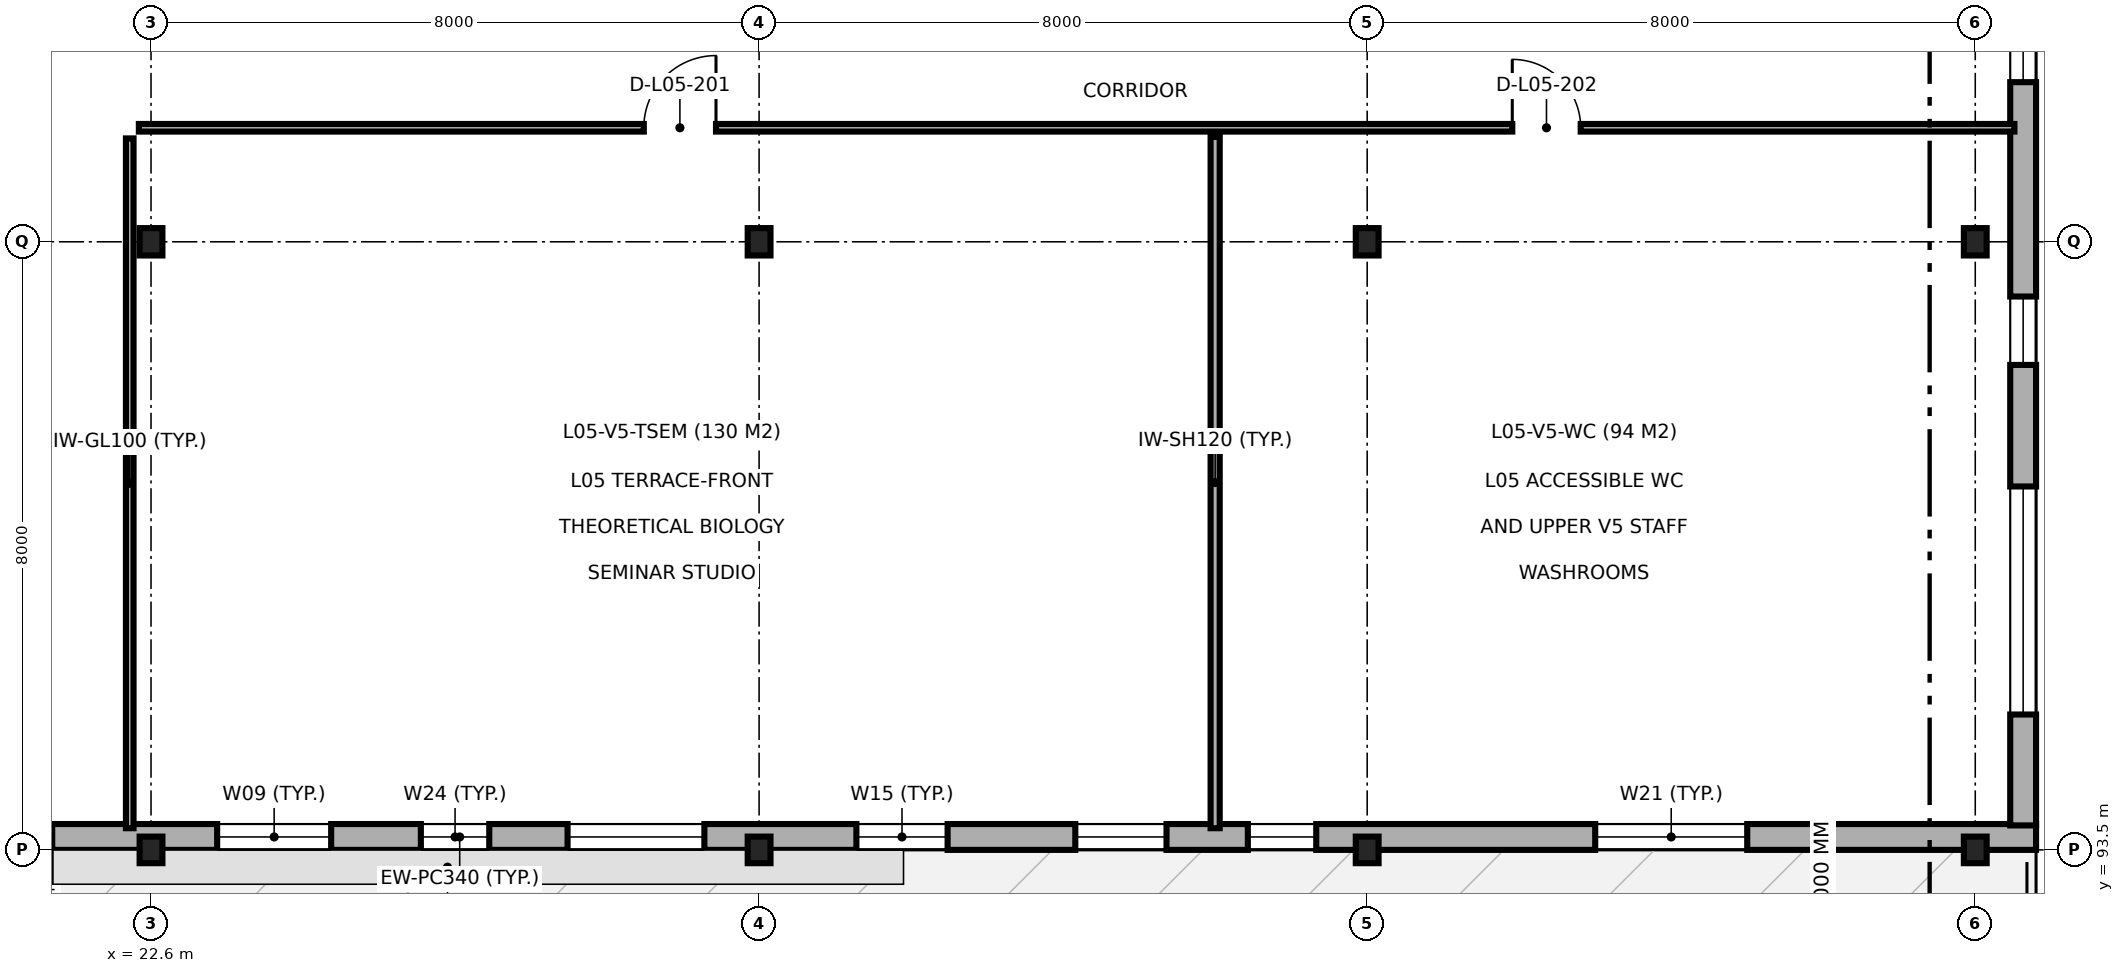
"""IFC4 building model, lengths in metres.
Left out: names, types, materials, properties, quantities, classifications, styles, units other than length and angle.
Written with IfcOpenShell. Run it as: python <this file> out.ifc"""

import sys

from ifc_helpers import new_model, si_unit, direction, frame, frame_2d, origin, origin_2d, place, context, subcontext, project, spatial, rectangle, i_section, extrude, element, fill, save


model = new_model("IFC4")
c1 = context("Model", 3, precision=1e-05, world=origin(), true_north=direction((0.0, 1.0)))
c2 = subcontext(c1, "Body", "Model", "MODEL_VIEW")
j1 = project(units=[si_unit("LENGTHUNIT", "METRE"), si_unit("PLANEANGLEUNIT", "RADIAN")], contexts=[c1])
p1 = place(None, origin())
s1 = spatial("IfcSite", under=j1, at=p1, CompositionType="ELEMENT")
p2 = place(p1, origin())
s2 = spatial("IfcBuilding", under=s1, at=p2, CompositionType="ELEMENT")
p3 = place(p2, frame((0.0, 0.0, 22.8)))
s3 = spatial("IfcBuildingStorey", under=s2, at=p3, CompositionType="ELEMENT", Elevation=22.8)
p4 = place(p3, frame((22.6, 93.5, 0.0), z_axis=(0.0, 0.0, 1.0), x_axis=(1.0, 0.0, 0.0)))
e1 = element("IfcColumn", 1, at=p4, inside=s3, PredefinedType="COLUMN", context=c2, shape_type="SweptSolid", body=[
    extrude(i_section(OverallWidth=0.3, OverallDepth=0.35, WebThickness=0.01, FlangeThickness=0.018, FilletRadius=0.027, at=origin_2d()), origin(), (0.0, 0.0, 1.0), 3.9),
])
p5 = place(p3, frame((22.6, 101.5, 0.0), z_axis=(0.0, 0.0, 1.0), x_axis=(1.0, 0.0, 0.0)))
e2 = element("IfcColumn", 2, at=p5, inside=s3, PredefinedType="COLUMN", context=c2, shape_type="SweptSolid", body=[
    extrude(i_section(OverallWidth=0.3, OverallDepth=0.36, WebThickness=0.012, FlangeThickness=0.022, FilletRadius=0.027, at=origin_2d()), origin(), (0.0, 0.0, 1.0), 3.9),
])
p6 = place(p3, frame((30.6, 93.5, 0.0), z_axis=(0.0, 0.0, 1.0), x_axis=(1.0, 0.0, 0.0)))
e3 = element("IfcColumn", 3, at=p6, inside=s3, PredefinedType="COLUMN", context=c2, shape_type="SweptSolid", body=[
    extrude(i_section(OverallWidth=0.3, OverallDepth=0.35, WebThickness=0.01, FlangeThickness=0.018, FilletRadius=0.027, at=origin_2d()), origin(), (0.0, 0.0, 1.0), 3.9),
])
p7 = place(p3, frame((30.6, 101.5, 0.0), z_axis=(0.0, 0.0, 1.0), x_axis=(1.0, 0.0, 0.0)))
e4 = element("IfcColumn", 4, at=p7, inside=s3, PredefinedType="COLUMN", context=c2, shape_type="SweptSolid", body=[
    extrude(i_section(OverallWidth=0.3, OverallDepth=0.36, WebThickness=0.012, FlangeThickness=0.022, FilletRadius=0.027, at=origin_2d()), origin(), (0.0, 0.0, 1.0), 3.9),
])
p8 = place(p3, frame((38.6, 93.5, 0.0), z_axis=(0.0, 0.0, 1.0), x_axis=(1.0, 0.0, 0.0)))
e5 = element("IfcColumn", 5, at=p8, inside=s3, PredefinedType="COLUMN", context=c2, shape_type="SweptSolid", body=[
    extrude(i_section(OverallWidth=0.3, OverallDepth=0.35, WebThickness=0.01, FlangeThickness=0.018, FilletRadius=0.027, at=origin_2d()), origin(), (0.0, 0.0, 1.0), 3.9),
])
p9 = place(p3, frame((38.6, 101.5, 0.0), z_axis=(0.0, 0.0, 1.0), x_axis=(1.0, 0.0, 0.0)))
e6 = element("IfcColumn", 6, at=p9, inside=s3, PredefinedType="COLUMN", context=c2, shape_type="SweptSolid", body=[
    extrude(i_section(OverallWidth=0.3, OverallDepth=0.36, WebThickness=0.012, FlangeThickness=0.022, FilletRadius=0.027, at=origin_2d()), origin(), (0.0, 0.0, 1.0), 3.9),
])
p10 = place(p3, frame((46.6, 93.5, 0.0), z_axis=(0.0, 0.0, 1.0), x_axis=(1.0, 0.0, 0.0)))
e7 = element("IfcColumn", 7, at=p10, inside=s3, PredefinedType="COLUMN", context=c2, shape_type="SweptSolid", body=[
    extrude(i_section(OverallWidth=0.3, OverallDepth=0.35, WebThickness=0.01, FlangeThickness=0.018, FilletRadius=0.027, at=origin_2d()), origin(), (0.0, 0.0, 1.0), 3.9),
])
p11 = place(p3, frame((46.6, 101.5, 0.0), z_axis=(0.0, 0.0, 1.0), x_axis=(1.0, 0.0, 0.0)))
e8 = element("IfcColumn", 8, at=p11, inside=s3, PredefinedType="COLUMN", context=c2, shape_type="SweptSolid", body=[
    extrude(i_section(OverallWidth=0.3, OverallDepth=0.36, WebThickness=0.012, FlangeThickness=0.022, FilletRadius=0.027, at=origin_2d()), origin(), (0.0, 0.0, 1.0), 3.9),
])
p12 = place(p3, frame((5.922, 93.67, 0.0), z_axis=(0.0, 0.0, 1.0), x_axis=(1.0, 0.0, 0.0)))
e9 = element("IfcWall", 9, at=p12, inside=s3, PredefinedType="SOLIDWALL", context=c2, shape_type="SweptSolid", body=[
    extrude(rectangle(XDim=41.478, YDim=0.34, at=frame_2d((20.739, 0.0))), origin(), (0.0, 0.0, 1.0), 3.68),
])
p13 = place(p12, frame((13.978, 0.0, 0.0)))
e10 = element("IfcOpeningElement", 10, at=p13, cuts=e9, PredefinedType="OPENING", context=c2, shape_type="SweptSolid", body=[
    extrude(rectangle(XDim=1.4, YDim=2.2, at=frame_2d((0.7, 1.1))), frame((0.0, 0.18, 0.0), z_axis=(0.0, -1.0, 0.0), x_axis=(1.0, 0.0, 0.0)), (0.0, 0.0, 1.0), 0.36),
])
p14 = place(p12, frame((3.778, 0.0, 0.9)))
e11 = element("IfcOpeningElement", 11, at=p14, cuts=e9, PredefinedType="OPENING", context=c2, shape_type="SweptSolid", body=[
    extrude(rectangle(XDim=1.8, YDim=1.8, at=frame_2d((0.9, 0.9))), frame((0.0, 0.18, 0.0), z_axis=(0.0, -1.0, 0.0), x_axis=(1.0, 0.0, 0.0)), (0.0, 0.0, 1.0), 0.36),
])
p15 = place(p12, frame((9.398, 0.0, 0.9)))
e12 = element("IfcOpeningElement", 12, at=p15, cuts=e9, PredefinedType="OPENING", context=c2, shape_type="SweptSolid", body=[
    extrude(rectangle(XDim=1.2, YDim=1.8, at=frame_2d((0.6, 0.9))), frame((0.0, 0.18, 0.0), z_axis=(0.0, -1.0, 0.0), x_axis=(1.0, 0.0, 0.0)), (0.0, 0.0, 1.0), 0.36),
])
p16 = place(p12, frame((11.523, 0.0, 0.9)))
e13 = element("IfcOpeningElement", 13, at=p16, cuts=e9, PredefinedType="OPENING", context=c2, shape_type="SweptSolid", body=[
    extrude(rectangle(XDim=1.8, YDim=2.1, at=frame_2d((0.9, 1.05))), frame((0.0, 0.18, 0.0), z_axis=(0.0, -1.0, 0.0), x_axis=(1.0, 0.0, 0.0)), (0.0, 0.0, 1.0), 0.36),
])
p17 = place(p12, frame((17.548, 0.0, 0.9)))
e14 = element("IfcOpeningElement", 14, at=p17, cuts=e9, PredefinedType="OPENING", context=c2, shape_type="SweptSolid", body=[
    extrude(rectangle(XDim=1.5, YDim=2.1, at=frame_2d((0.75, 1.05))), frame((0.0, 0.18, 0.0), z_axis=(0.0, -1.0, 0.0), x_axis=(1.0, 0.0, 0.0)), (0.0, 0.0, 1.0), 0.36),
])
p18 = place(p12, frame((20.228, 0.0, 0.9)))
e15 = element("IfcOpeningElement", 15, at=p18, cuts=e9, PredefinedType="OPENING", context=c2, shape_type="SweptSolid", body=[
    extrude(rectangle(XDim=0.9, YDim=1.8, at=frame_2d((0.45, 0.9))), frame((0.0, 0.18, 0.0), z_axis=(0.0, -1.0, 0.0), x_axis=(1.0, 0.0, 0.0)), (0.0, 0.0, 1.0), 0.36),
])
p19 = place(p12, frame((22.158, 0.0, 0.9)))
e16 = element("IfcOpeningElement", 16, at=p19, cuts=e9, PredefinedType="OPENING", context=c2, shape_type="SweptSolid", body=[
    extrude(rectangle(XDim=1.8, YDim=2.1, at=frame_2d((0.9, 1.05))), frame((0.0, 0.18, 0.0), z_axis=(0.0, -1.0, 0.0), x_axis=(1.0, 0.0, 0.0)), (0.0, 0.0, 1.0), 0.36),
])
p20 = place(p12, frame((25.958, 0.0, 0.9)))
e17 = element("IfcOpeningElement", 17, at=p20, cuts=e9, PredefinedType="OPENING", context=c2, shape_type="SweptSolid", body=[
    extrude(rectangle(XDim=1.2, YDim=1.5, at=frame_2d((0.6, 0.75))), frame((0.0, 0.18, 0.0), z_axis=(0.0, -1.0, 0.0), x_axis=(1.0, 0.0, 0.0)), (0.0, 0.0, 1.0), 0.36),
])
p21 = place(p12, frame((28.838, 0.0, 0.9)))
e18 = element("IfcOpeningElement", 18, at=p21, cuts=e9, PredefinedType="OPENING", context=c2, shape_type="SweptSolid", body=[
    extrude(rectangle(XDim=1.2, YDim=1.8, at=frame_2d((0.6, 0.9))), frame((0.0, 0.18, 0.0), z_axis=(0.0, -1.0, 0.0), x_axis=(1.0, 0.0, 0.0)), (0.0, 0.0, 1.0), 0.36),
])
p22 = place(p12, frame((31.108, 0.0, 0.9)))
e19 = element("IfcOpeningElement", 19, at=p22, cuts=e9, PredefinedType="OPENING", context=c2, shape_type="SweptSolid", body=[
    extrude(rectangle(XDim=0.9, YDim=1.8, at=frame_2d((0.45, 0.9))), frame((0.0, 0.18, 0.0), z_axis=(0.0, -1.0, 0.0), x_axis=(1.0, 0.0, 0.0)), (0.0, 0.0, 1.0), 0.36),
])
p23 = place(p12, frame((35.678, 0.0, 0.9)))
e20 = element("IfcOpeningElement", 20, at=p23, cuts=e9, PredefinedType="OPENING", context=c2, shape_type="SweptSolid", body=[
    extrude(rectangle(XDim=2.0, YDim=2.4, at=frame_2d((1.0, 1.2))), frame((0.0, 0.18, 0.0), z_axis=(0.0, -1.0, 0.0), x_axis=(1.0, 0.0, 0.0)), (0.0, 0.0, 1.0), 0.36),
])
p24 = place(p3, frame((47.23, 93.822, 0.0), z_axis=(0.0, 0.0, 1.0), x_axis=(0.0, 1.0, 0.0)))
e21 = element("IfcWall", 21, at=p24, inside=s3, PredefinedType="SOLIDWALL", context=c2, shape_type="SweptSolid", body=[
    extrude(rectangle(XDim=22.278, YDim=0.34, at=frame_2d((11.139, 0.0))), origin(), (0.0, 0.0, 1.0), 3.68),
])
p25 = place(p24, frame((1.459, 0.0, 0.9)))
e22 = element("IfcOpeningElement", 22, at=p25, cuts=e21, PredefinedType="OPENING", context=c2, shape_type="SweptSolid", body=[
    extrude(rectangle(XDim=3.0, YDim=2.1, at=frame_2d((1.5, 1.05))), frame((0.0, 0.18, 0.0), z_axis=(0.0, -1.0, 0.0), x_axis=(1.0, 0.0, 0.0)), (0.0, 0.0, 1.0), 0.36),
])
p26 = place(p24, frame((6.058, 0.0, 0.9)))
e23 = element("IfcOpeningElement", 23, at=p26, cuts=e21, PredefinedType="OPENING", context=c2, shape_type="SweptSolid", body=[
    extrude(rectangle(XDim=0.9, YDim=1.8, at=frame_2d((0.45, 0.9))), frame((0.0, 0.18, 0.0), z_axis=(0.0, -1.0, 0.0), x_axis=(1.0, 0.0, 0.0)), (0.0, 0.0, 1.0), 0.36),
])
p27 = place(p24, frame((9.778, 0.0, 0.9)))
e24 = element("IfcOpeningElement", 24, at=p27, cuts=e21, PredefinedType="OPENING", context=c2, shape_type="SweptSolid", body=[
    extrude(rectangle(XDim=1.2, YDim=1.8, at=frame_2d((0.6, 0.9))), frame((0.0, 0.18, 0.0), z_axis=(0.0, -1.0, 0.0), x_axis=(1.0, 0.0, 0.0)), (0.0, 0.0, 1.0), 0.36),
])
p28 = place(p24, frame((12.708, 0.0, 0.9)))
e25 = element("IfcOpeningElement", 25, at=p28, cuts=e21, PredefinedType="OPENING", context=c2, shape_type="SweptSolid", body=[
    extrude(rectangle(XDim=1.6, YDim=2.4, at=frame_2d((0.8, 1.2))), frame((0.0, 0.18, 0.0), z_axis=(0.0, -1.0, 0.0), x_axis=(1.0, 0.0, 0.0)), (0.0, 0.0, 1.0), 0.36),
])
p29 = place(p24, frame((17.368, 0.0, 0.9)))
e26 = element("IfcOpeningElement", 26, at=p29, cuts=e21, PredefinedType="OPENING", context=c2, shape_type="SweptSolid", body=[
    extrude(rectangle(XDim=2.6, YDim=2.4, at=frame_2d((1.3, 1.2))), frame((0.0, 0.18, 0.0), z_axis=(0.0, -1.0, 0.0), x_axis=(1.0, 0.0, 0.0)), (0.0, 0.0, 1.0), 0.36),
])
p30 = place(p3, frame((22.32, 93.785, 0.0), z_axis=(0.0, 0.0, 1.0), x_axis=(0.0, 1.0, 0.0)))
e27 = element("IfcWall", 27, at=p30, inside=s3, PredefinedType="PARTITIONING", context=c2, shape_type="SweptSolid", body=[
    extrude(rectangle(XDim=9.075, YDim=0.1, at=frame_2d((4.538, 0.0))), origin(), (0.0, 0.0, 1.0), 3.28),
])
p31 = place(p3, frame((36.6, 93.785, 0.0), z_axis=(0.0, 0.0, 1.0), x_axis=(0.0, 1.0, 0.0)))
e28 = element("IfcWall", 28, at=p31, inside=s3, PredefinedType="PARTITIONING", context=c2, shape_type="SweptSolid", body=[
    extrude(rectangle(XDim=9.095, YDim=0.12, at=frame_2d((4.547, 0.0))), origin(), (0.0, 0.0, 1.0), 3.68),
])
p32 = place(p3, frame((22.44, 103.0, 0.0), z_axis=(0.0, 0.0, 1.0), x_axis=(1.0, 0.0, 0.0)))
e29 = element("IfcWall", 29, at=p32, inside=s3, PredefinedType="PARTITIONING", context=c2, shape_type="SweptSolid", body=[
    extrude(rectangle(XDim=24.675, YDim=0.1, at=frame_2d((12.337, 0.0))), origin(), (0.0, 0.0, 1.0), 3.68),
])
p33 = place(p32, frame((6.643, 0.0, 0.0)))
e30 = element("IfcOpeningElement", 30, at=p33, cuts=e29, PredefinedType="OPENING", context=c2, shape_type="SweptSolid", body=[
    extrude(rectangle(XDim=0.95, YDim=2.1, at=frame_2d((0.475, 1.05))), frame((0.0, 0.06, 0.0), z_axis=(0.0, -1.0, 0.0), x_axis=(1.0, 0.0, 0.0)), (0.0, 0.0, 1.0), 0.12),
])
p34 = place(p32, frame((18.069, 0.0, 0.0)))
e31 = element("IfcOpeningElement", 31, at=p34, cuts=e29, PredefinedType="OPENING", context=c2, shape_type="SweptSolid", body=[
    extrude(rectangle(XDim=0.9, YDim=2.1, at=frame_2d((0.45, 1.05))), frame((0.0, 0.06, 0.0), z_axis=(0.0, -1.0, 0.0), x_axis=(1.0, 0.0, 0.0)), (0.0, 0.0, 1.0), 0.12),
])
p35 = place(p17, origin())
e32 = element("IfcWindow", 32, at=p35, inside=s3, PartitioningType="SINGLE_PANEL", PredefinedType="WINDOW", context=c2, shape_type="SweptSolid", body=[
    extrude(rectangle(XDim=1.5, YDim=2.1, at=frame_2d((0.75, 1.05))), frame((0.0, 0.03, 0.0), z_axis=(0.0, -1.0, 0.0), x_axis=(1.0, 0.0, 0.0)), (0.0, 0.0, 1.0), 0.06),
])
fill(e14, e32)
p36 = place(p18, origin())
e33 = element("IfcWindow", 33, at=p36, inside=s3, PartitioningType="SINGLE_PANEL", PredefinedType="WINDOW", context=c2, shape_type="SweptSolid", body=[
    extrude(rectangle(XDim=0.9, YDim=1.8, at=frame_2d((0.45, 0.9))), frame((0.0, 0.03, 0.0), z_axis=(0.0, -1.0, 0.0), x_axis=(1.0, 0.0, 0.0)), (0.0, 0.0, 1.0), 0.06),
])
fill(e15, e33)
p37 = place(p19, origin())
e34 = element("IfcWindow", 34, at=p37, inside=s3, PartitioningType="SINGLE_PANEL", PredefinedType="WINDOW", context=c2, shape_type="SweptSolid", body=[
    extrude(rectangle(XDim=1.8, YDim=2.1, at=frame_2d((0.9, 1.05))), frame((0.0, 0.03, 0.0), z_axis=(0.0, -1.0, 0.0), x_axis=(1.0, 0.0, 0.0)), (0.0, 0.0, 1.0), 0.06),
])
fill(e16, e34)
p38 = place(p20, origin())
e35 = element("IfcWindow", 35, at=p38, inside=s3, PartitioningType="SINGLE_PANEL", PredefinedType="WINDOW", context=c2, shape_type="SweptSolid", body=[
    extrude(rectangle(XDim=1.2, YDim=1.5, at=frame_2d((0.6, 0.75))), frame((0.0, 0.03, 0.0), z_axis=(0.0, -1.0, 0.0), x_axis=(1.0, 0.0, 0.0)), (0.0, 0.0, 1.0), 0.06),
])
fill(e17, e35)
p39 = place(p21, origin())
e36 = element("IfcWindow", 36, at=p39, inside=s3, PartitioningType="SINGLE_PANEL", PredefinedType="WINDOW", context=c2, shape_type="SweptSolid", body=[
    extrude(rectangle(XDim=1.2, YDim=1.8, at=frame_2d((0.6, 0.9))), frame((0.0, 0.03, 0.0), z_axis=(0.0, -1.0, 0.0), x_axis=(1.0, 0.0, 0.0)), (0.0, 0.0, 1.0), 0.06),
])
fill(e18, e36)
p40 = place(p22, origin())
e37 = element("IfcWindow", 37, at=p40, inside=s3, PartitioningType="SINGLE_PANEL", PredefinedType="WINDOW", context=c2, shape_type="SweptSolid", body=[
    extrude(rectangle(XDim=0.9, YDim=1.8, at=frame_2d((0.45, 0.9))), frame((0.0, 0.03, 0.0), z_axis=(0.0, -1.0, 0.0), x_axis=(1.0, 0.0, 0.0)), (0.0, 0.0, 1.0), 0.06),
])
fill(e19, e37)
p41 = place(p23, origin())
e38 = element("IfcWindow", 38, at=p41, inside=s3, PartitioningType="SINGLE_PANEL", PredefinedType="WINDOW", context=c2, shape_type="SweptSolid", body=[
    extrude(rectangle(XDim=2.0, YDim=2.4, at=frame_2d((1.0, 1.2))), frame((0.0, 0.03, 0.0), z_axis=(0.0, -1.0, 0.0), x_axis=(1.0, 0.0, 0.0)), (0.0, 0.0, 1.0), 0.06),
])
fill(e20, e38)
p42 = place(p25, origin())
e39 = element("IfcWindow", 39, at=p42, inside=s3, PartitioningType="SINGLE_PANEL", PredefinedType="WINDOW", context=c2, shape_type="SweptSolid", body=[
    extrude(rectangle(XDim=3.0, YDim=2.1, at=frame_2d((1.5, 1.05))), frame((0.0, 0.03, 0.0), z_axis=(0.0, -1.0, 0.0), x_axis=(1.0, 0.0, 0.0)), (0.0, 0.0, 1.0), 0.06),
])
fill(e22, e39)
p43 = place(p26, origin())
e40 = element("IfcWindow", 40, at=p43, inside=s3, PartitioningType="SINGLE_PANEL", PredefinedType="WINDOW", context=c2, shape_type="SweptSolid", body=[
    extrude(rectangle(XDim=0.9, YDim=1.8, at=frame_2d((0.45, 0.9))), frame((0.0, 0.03, 0.0), z_axis=(0.0, -1.0, 0.0), x_axis=(1.0, 0.0, 0.0)), (0.0, 0.0, 1.0), 0.06),
])
fill(e23, e40)
p44 = place(p27, origin())
e41 = element("IfcWindow", 41, at=p44, inside=s3, PartitioningType="SINGLE_PANEL", PredefinedType="WINDOW", context=c2, shape_type="SweptSolid", body=[
    extrude(rectangle(XDim=1.2, YDim=1.8, at=frame_2d((0.6, 0.9))), frame((0.0, 0.03, 0.0), z_axis=(0.0, -1.0, 0.0), x_axis=(1.0, 0.0, 0.0)), (0.0, 0.0, 1.0), 0.06),
])
fill(e24, e41)
p45 = place(p33, origin())
e42 = element("IfcDoor", 42, at=p45, inside=s3, OperationType="SINGLE_SWING_RIGHT", PredefinedType="DOOR", context=c2, shape_type="SweptSolid", body=[
    extrude(rectangle(XDim=0.95, YDim=2.1, at=frame_2d((0.475, 1.05))), frame((0.0, 0.025, 0.0), z_axis=(0.0, -1.0, 0.0), x_axis=(1.0, 0.0, 0.0)), (0.0, 0.0, 1.0), 0.05),
])
fill(e30, e42)
p46 = place(p34, origin())
e43 = element("IfcDoor", 43, at=p46, inside=s3, OperationType="SINGLE_SWING_LEFT", PredefinedType="DOOR", context=c2, shape_type="SweptSolid", body=[
    extrude(rectangle(XDim=0.9, YDim=2.1, at=frame_2d((0.45, 1.05))), frame((0.0, 0.025, 0.0), z_axis=(0.0, -1.0, 0.0), x_axis=(1.0, 0.0, 0.0)), (0.0, 0.0, 1.0), 0.05),
])
fill(e31, e43)
save(model, sys.argv[1])
